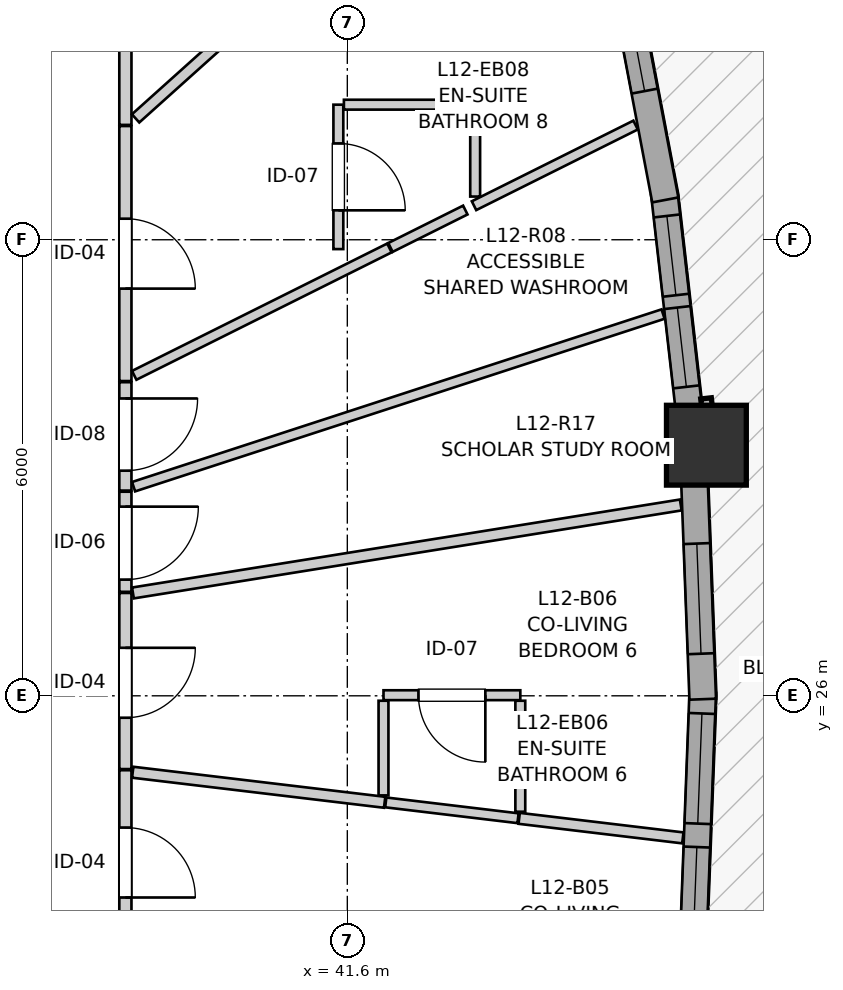
"""IFC4 building model, lengths in metres.
Left out: names, types, materials, properties, quantities, classifications, styles, units other than length and angle.
Written with IfcOpenShell. Run it as: python <this file> out.ifc"""

import sys

from ifc_helpers import new_model, si_unit, direction, frame, frame_2d, origin, origin_2d, place, context, subcontext, project, spatial, rectangle, extrude, source, transform, mapped, element, fill, save


model = new_model("IFC4")
c1 = context("Model", 3, precision=1e-05, world=origin(), true_north=direction((0.0, 1.0)))
c2 = subcontext(c1, "Body", "Model", "MODEL_VIEW")
j1 = project(units=[si_unit("LENGTHUNIT", "METRE"), si_unit("PLANEANGLEUNIT", "RADIAN")], contexts=[c1])
p1 = place(None, origin())
s1 = spatial("IfcSite", under=j1, at=p1, CompositionType="ELEMENT")
p2 = place(p1, origin())
s2 = spatial("IfcBuilding", under=s1, at=p2, CompositionType="ELEMENT")
p3 = place(p2, frame((0.0, 0.0, 43.0)))
s3 = spatial("IfcBuildingStorey", under=s2, at=p3, CompositionType="ELEMENT", Elevation=43.0)
m1 = source(origin(), c2, "Body", "SweptSolid", [
    extrude(rectangle(XDim=1.05, YDim=1.05, at=origin_2d()), origin(), (0.0, 0.0, 1.0), 2.94),
])
p4 = place(p3, frame((46.324, 29.297, 0.0), z_axis=(0.0, 0.0, 1.0), x_axis=(1.0, 0.0, 0.0)))
e1 = element("IfcColumn", 1, at=p4, inside=s3, PredefinedType="COLUMN", context=c2, shape_type="MappedRepresentation", body=[
    mapped(m1, transform((0.0, 0.0, 0.0), x_axis=(1.0, 0.0, 0.0), y_axis=(0.0, 1.0, 0.0), z_axis=(0.0, 0.0, 1.0), scale=1.0)),
])
p5 = place(p3, frame((46.15, 22.729, 0.0), z_axis=(0.0, 0.0, 1.0), x_axis=(0.03797244671, 0.999278786571, 0.0)))
e2 = element("IfcWall", 2, at=p5, inside=s3, PredefinedType="SOLIDWALL", context=c2, shape_type="SweptSolid", body=[
    extrude(rectangle(XDim=3.318, YDim=0.35, at=frame_2d((1.659, 0.0))), origin(), (0.0, 0.0, 1.0), 2.42),
])
p6 = place(p5, frame((0.332, 0.0, 0.82)))
e3 = element("IfcOpeningElement", 3, at=p6, cuts=e2, PredefinedType="OPENING", context=c2, shape_type="SweptSolid", body=[
    extrude(rectangle(XDim=0.95, YDim=1.35, at=frame_2d((0.475, 0.675))), frame((0.0, 0.185, 0.0), z_axis=(0.0, -1.0, 0.0), x_axis=(1.0, 0.0, 0.0)), (0.0, 0.0, 1.0), 0.37),
])
p7 = place(p5, frame((1.59, 0.0, 0.82)))
e4 = element("IfcOpeningElement", 4, at=p7, cuts=e2, PredefinedType="OPENING", context=c2, shape_type="SweptSolid", body=[
    extrude(rectangle(XDim=1.45, YDim=1.25, at=frame_2d((0.725, 0.625))), frame((0.0, 0.185, 0.0), z_axis=(0.0, -1.0, 0.0), x_axis=(1.0, 0.0, 0.0)), (0.0, 0.0, 1.0), 0.37),
])
p8 = place(p3, frame((46.276, 25.955, 0.0), z_axis=(0.0, 0.0, 1.0), x_axis=(-0.037939203929, 0.999280049238, 0.0)))
e5 = element("IfcWall", 5, at=p8, inside=s3, PredefinedType="SOLIDWALL", context=c2, shape_type="SweptSolid", body=[
    extrude(rectangle(XDim=3.037, YDim=0.35, at=frame_2d((1.519, 0.0))), origin(), (0.0, 0.0, 1.0), 2.42),
])
p9 = place(p8, frame((0.599, 0.0, 0.82)))
e6 = element("IfcOpeningElement", 6, at=p9, cuts=e5, PredefinedType="OPENING", context=c2, shape_type="SweptSolid", body=[
    extrude(rectangle(XDim=1.45, YDim=1.25, at=frame_2d((0.725, 0.625))), frame((0.0, 0.185, 0.0), z_axis=(0.0, -1.0, 0.0), x_axis=(1.0, 0.0, 0.0)), (0.0, 0.0, 1.0), 0.37),
])
p10 = place(p3, frame((46.116, 29.575, 0.0), z_axis=(0.0, 0.0, 1.0), x_axis=(-0.113271733229, 0.993564046477, 0.0)))
e7 = element("IfcWall", 7, at=p10, inside=s3, PredefinedType="SOLIDWALL", context=c2, shape_type="SweptSolid", body=[
    extrude(rectangle(XDim=3.056, YDim=0.35, at=frame_2d((1.528, 0.0))), origin(), (0.0, 0.0, 1.0), 2.42),
])
p11 = place(p10, frame((0.492, 0.0, 0.82)))
e8 = element("IfcOpeningElement", 8, at=p11, cuts=e7, PredefinedType="OPENING", context=c2, shape_type="SweptSolid", body=[
    extrude(rectangle(XDim=1.05, YDim=1.45, at=frame_2d((0.525, 0.725))), frame((0.0, 0.185, 0.0), z_axis=(0.0, -1.0, 0.0), x_axis=(1.0, 0.0, 0.0)), (0.0, 0.0, 1.0), 0.37),
])
p12 = place(p10, frame((1.706, 0.0, 0.82)))
e9 = element("IfcOpeningElement", 9, at=p12, cuts=e7, PredefinedType="OPENING", context=c2, shape_type="SweptSolid", body=[
    extrude(rectangle(XDim=1.05, YDim=1.45, at=frame_2d((0.525, 0.725))), frame((0.0, 0.185, 0.0), z_axis=(0.0, -1.0, 0.0), x_axis=(1.0, 0.0, 0.0)), (0.0, 0.0, 1.0), 0.37),
])
p13 = place(p3, frame((45.784, 32.524, 0.0), z_axis=(0.0, 0.0, 1.0), x_axis=(-0.186686485801, 0.982419541754, 0.0)))
e10 = element("IfcWall", 10, at=p13, inside=s3, PredefinedType="SOLIDWALL", context=c2, shape_type="SweptSolid", body=[
    extrude(rectangle(XDim=3.374, YDim=0.35, at=frame_2d((1.687, 0.0))), origin(), (0.0, 0.0, 1.0), 2.42),
])
p14 = place(p13, frame((1.457, 0.0, 0.82)))
e11 = element("IfcOpeningElement", 11, at=p14, cuts=e10, PredefinedType="OPENING", context=c2, shape_type="SweptSolid", body=[
    extrude(rectangle(XDim=1.45, YDim=1.25, at=frame_2d((0.725, 0.625))), frame((0.0, 0.185, 0.0), z_axis=(0.0, -1.0, 0.0), x_axis=(1.0, 0.0, 0.0)), (0.0, 0.0, 1.0), 0.37),
])
p15 = place(p3, frame((38.68, 33.496, 0.0), z_axis=(0.0, 0.0, 1.0), x_axis=(0.0, -1.0, 0.0)))
e12 = element("IfcWall", 12, at=p15, inside=s3, PredefinedType="PARTITIONING", context=c2, shape_type="SweptSolid", body=[
    extrude(rectangle(XDim=3.355, YDim=0.16, at=frame_2d((1.677, 0.0))), origin(), (0.0, 0.0, 1.0), 2.94),
])
p16 = place(p15, frame((1.219, 0.0, 0.0)))
e13 = element("IfcOpeningElement", 13, at=p16, cuts=e12, PredefinedType="OPENING", context=c2, shape_type="SweptSolid", body=[
    extrude(rectangle(XDim=0.92, YDim=2.1, at=frame_2d((0.46, 1.05))), frame((0.0, 0.09, 0.0), z_axis=(0.0, -1.0, 0.0), x_axis=(1.0, 0.0, 0.0)), (0.0, 0.0, 1.0), 0.18),
])
p17 = place(p3, frame((38.68, 36.58, 0.0), z_axis=(0.0, 0.0, 1.0), x_axis=(0.0, -1.0, 0.0)))
e14 = element("IfcWall", 14, at=p17, inside=s3, PredefinedType="PARTITIONING", context=c2, shape_type="SweptSolid", body=[
    extrude(rectangle(XDim=3.069, YDim=0.16, at=frame_2d((1.535, 0.0))), origin(), (0.0, 0.0, 1.0), 2.94),
])
p18 = place(p17, frame((1.092, 0.0, 0.0)))
e15 = element("IfcOpeningElement", 15, at=p18, cuts=e14, PredefinedType="OPENING", context=c2, shape_type="SweptSolid", body=[
    extrude(rectangle(XDim=0.92, YDim=2.1, at=frame_2d((0.46, 1.05))), frame((0.0, 0.09, 0.0), z_axis=(0.0, -1.0, 0.0), x_axis=(1.0, 0.0, 0.0)), (0.0, 0.0, 1.0), 0.18),
])
p19 = place(p3, frame((38.68, 25.021, 0.0), z_axis=(0.0, 0.0, 1.0), x_axis=(0.0, -1.0, 0.0)))
e16 = element("IfcWall", 16, at=p19, inside=s3, PredefinedType="PARTITIONING", context=c2, shape_type="SweptSolid", body=[
    extrude(rectangle(XDim=2.383, YDim=0.16, at=frame_2d((1.191, 0.0))), origin(), (0.0, 0.0, 1.0), 2.94),
])
p20 = place(p19, frame((0.754, 0.0, 0.0)))
e17 = element("IfcOpeningElement", 17, at=p20, cuts=e16, PredefinedType="OPENING", context=c2, shape_type="SweptSolid", body=[
    extrude(rectangle(XDim=0.92, YDim=2.1, at=frame_2d((0.46, 1.05))), frame((0.0, 0.09, 0.0), z_axis=(0.0, -1.0, 0.0), x_axis=(1.0, 0.0, 0.0)), (0.0, 0.0, 1.0), 0.18),
])
p21 = place(p3, frame((38.68, 27.353, 0.0), z_axis=(0.0, 0.0, 1.0), x_axis=(0.0, -1.0, 0.0)))
e18 = element("IfcWall", 18, at=p21, inside=s3, PredefinedType="PARTITIONING", context=c2, shape_type="SweptSolid", body=[
    extrude(rectangle(XDim=2.317, YDim=0.16, at=frame_2d((1.159, 0.0))), origin(), (0.0, 0.0, 1.0), 2.94),
])
p22 = place(p21, frame((0.721, 0.0, 0.0)))
e19 = element("IfcOpeningElement", 19, at=p22, cuts=e18, PredefinedType="OPENING", context=c2, shape_type="SweptSolid", body=[
    extrude(rectangle(XDim=0.92, YDim=2.1, at=frame_2d((0.46, 1.05))), frame((0.0, 0.09, 0.0), z_axis=(0.0, -1.0, 0.0), x_axis=(1.0, 0.0, 0.0)), (0.0, 0.0, 1.0), 0.18),
])
p23 = place(p3, frame((41.482, 33.777, 0.0), z_axis=(0.0, 0.0, 1.0), x_axis=(0.0, -1.0, 0.0)))
e20 = element("IfcWall", 20, at=p23, inside=s3, PredefinedType="PARTITIONING", context=c2, shape_type="SweptSolid", body=[
    extrude(rectangle(XDim=1.9, YDim=0.13, at=frame_2d((0.95, 0.0))), origin(), (0.0, 0.0, 1.0), 2.94),
])
p24 = place(p23, frame((0.51, 0.0, 0.0)))
e21 = element("IfcOpeningElement", 21, at=p24, cuts=e20, PredefinedType="OPENING", context=c2, shape_type="SweptSolid", body=[
    extrude(rectangle(XDim=0.88, YDim=2.05, at=frame_2d((0.44, 1.025))), frame((0.0, 0.075, 0.0), z_axis=(0.0, -1.0, 0.0), x_axis=(1.0, 0.0, 0.0)), (0.0, 0.0, 1.0), 0.15),
])
p25 = place(p3, frame((43.876, 26.008, 0.0), z_axis=(0.0, 0.0, 1.0), x_axis=(-1.0, 0.0, 0.0)))
e22 = element("IfcWall", 22, at=p25, inside=s3, PredefinedType="PARTITIONING", context=c2, shape_type="SweptSolid", body=[
    extrude(rectangle(XDim=1.8, YDim=0.13, at=frame_2d((0.9, 0.0))), origin(), (0.0, 0.0, 1.0), 2.94),
])
p26 = place(p25, frame((0.46, 0.0, 0.0)))
e23 = element("IfcOpeningElement", 23, at=p26, cuts=e22, PredefinedType="OPENING", context=c2, shape_type="SweptSolid", body=[
    extrude(rectangle(XDim=0.88, YDim=2.05, at=frame_2d((0.44, 1.025))), frame((0.0, 0.075, 0.0), z_axis=(0.0, -1.0, 0.0), x_axis=(1.0, 0.0, 0.0)), (0.0, 0.0, 1.0), 0.15),
])
p27 = place(p3, frame((38.68, 30.126, 0.0), z_axis=(0.0, 0.0, 1.0), x_axis=(0.0, -1.0, 0.0)))
e24 = element("IfcWall", 24, at=p27, inside=s3, PredefinedType="PARTITIONING", context=c2, shape_type="SweptSolid", body=[
    extrude(rectangle(XDim=1.426, YDim=0.16, at=frame_2d((0.713, 0.0))), origin(), (0.0, 0.0, 1.0), 2.94),
])
p28 = place(p27, frame((0.214, 0.0, 0.0)))
e25 = element("IfcOpeningElement", 25, at=p28, cuts=e24, PredefinedType="OPENING", context=c2, shape_type="SweptSolid", body=[
    extrude(rectangle(XDim=0.95, YDim=2.1, at=frame_2d((0.475, 1.05))), frame((0.0, 0.09, 0.0), z_axis=(0.0, -1.0, 0.0), x_axis=(1.0, 0.0, 0.0)), (0.0, 0.0, 1.0), 0.18),
])
p29 = place(p3, frame((38.68, 28.685, 0.0), z_axis=(0.0, 0.0, 1.0), x_axis=(0.0, -1.0, 0.0)))
e26 = element("IfcWall", 26, at=p29, inside=s3, PredefinedType="PARTITIONING", context=c2, shape_type="SweptSolid", body=[
    extrude(rectangle(XDim=1.317, YDim=0.16, at=frame_2d((0.659, 0.0))), origin(), (0.0, 0.0, 1.0), 2.94),
])
p30 = place(p29, frame((0.196, 0.0, 0.0)))
e27 = element("IfcOpeningElement", 27, at=p30, cuts=e26, PredefinedType="OPENING", context=c2, shape_type="SweptSolid", body=[
    extrude(rectangle(XDim=0.96, YDim=2.1, at=frame_2d((0.48, 1.05))), frame((0.0, 0.09, 0.0), z_axis=(0.0, -1.0, 0.0), x_axis=(1.0, 0.0, 0.0)), (0.0, 0.0, 1.0), 0.18),
])
p31 = place(p3, frame((38.788, 28.751, 0.0), z_axis=(0.0, 0.0, 1.0), x_axis=(0.95075822996, 0.309933522169, 0.0)))
e28 = element("IfcWall", 28, at=p31, inside=s3, PredefinedType="PARTITIONING", context=c2, shape_type="SweptSolid", body=[
    extrude(rectangle(XDim=7.327, YDim=0.13, at=frame_2d((3.664, 0.0))), origin(), (0.0, 0.0, 1.0), 2.94),
])
p32 = place(p3, frame((38.779, 27.353, 0.0), z_axis=(0.0, 0.0, 1.0), x_axis=(0.987345710334, 0.158582622897, 0.0)))
e29 = element("IfcWall", 29, at=p32, inside=s3, PredefinedType="PARTITIONING", context=c2, shape_type="SweptSolid", body=[
    extrude(rectangle(XDim=7.3, YDim=0.145, at=frame_2d((3.65, 0.0))), origin(), (0.0, 0.0, 1.0), 2.94),
])
p33 = place(p3, frame((38.814, 33.597, 0.0), z_axis=(0.0, 0.0, 1.0), x_axis=(0.74417856937, 0.667980730927, 0.0)))
e30 = element("IfcWall", 30, at=p33, inside=s3, PredefinedType="PARTITIONING", context=c2, shape_type="SweptSolid", body=[
    extrude(rectangle(XDim=4.005, YDim=0.145, at=frame_2d((2.002, 0.0))), origin(), (0.0, 0.0, 1.0), 2.94),
])
p34 = place(p3, frame((38.796, 30.216, 0.0), z_axis=(0.0, 0.0, 1.0), x_axis=(0.894739227469, 0.446588977503, 0.0)))
e31 = element("IfcWall", 31, at=p34, inside=s3, PredefinedType="PARTITIONING", context=c2, shape_type="SweptSolid", body=[
    extrude(rectangle(XDim=3.753, YDim=0.13, at=frame_2d((1.876, 0.0))), origin(), (0.0, 0.0, 1.0), 2.94),
])
p35 = place(p3, frame((38.777, 24.994, 0.0), z_axis=(0.0, 0.0, 1.0), x_axis=(0.992964132073, -0.1184155075, 0.0)))
e32 = element("IfcWall", 32, at=p35, inside=s3, PredefinedType="PARTITIONING", context=c2, shape_type="SweptSolid", body=[
    extrude(rectangle(XDim=3.338, YDim=0.145, at=frame_2d((1.669, 0.0))), origin(), (0.0, 0.0, 1.0), 2.94),
])
p36 = place(p3, frame((43.267, 32.448, 0.0), z_axis=(0.0, 0.0, 1.0), x_axis=(0.894755827923, 0.446555717014, 0.0)))
e33 = element("IfcWall", 33, at=p36, inside=s3, PredefinedType="PARTITIONING", context=c2, shape_type="SweptSolid", body=[
    extrude(rectangle(XDim=2.375, YDim=0.13, at=frame_2d((1.188, 0.0))), origin(), (0.0, 0.0, 1.0), 2.94),
])
p37 = place(p3, frame((43.861, 24.388, 0.0), z_axis=(0.0, 0.0, 1.0), x_axis=(0.992948573357, -0.118545901105, 0.0)))
e34 = element("IfcWall", 34, at=p37, inside=s3, PredefinedType="PARTITIONING", context=c2, shape_type="SweptSolid", body=[
    extrude(rectangle(XDim=2.169, YDim=0.145, at=frame_2d((1.084, 0.0))), origin(), (0.0, 0.0, 1.0), 2.94),
])
p38 = place(p3, frame((41.555, 33.777, 0.0), z_axis=(0.0, 0.0, 1.0), x_axis=(1.0, 0.0, 0.0)))
e35 = element("IfcWall", 35, at=p38, inside=s3, PredefinedType="PARTITIONING", context=c2, shape_type="SweptSolid", body=[
    extrude(rectangle(XDim=1.727, YDim=0.13, at=frame_2d((0.864, 0.0))), origin(), (0.0, 0.0, 1.0), 2.94),
])
p39 = place(p3, frame((42.106, 24.598, 0.0), z_axis=(0.0, 0.0, 1.0), x_axis=(0.992915674768, -0.118821137848, 0.0)))
e36 = element("IfcWall", 36, at=p39, inside=s3, PredefinedType="PARTITIONING", context=c2, shape_type="SweptSolid", body=[
    extrude(rectangle(XDim=1.753, YDim=0.13, at=frame_2d((0.876, 0.0))), origin(), (0.0, 0.0, 1.0), 2.94),
])
p40 = place(p3, frame((43.876, 24.475, 0.0), z_axis=(0.0, 0.0, 1.0), x_axis=(0.0, 1.0, 0.0)))
e37 = element("IfcWall", 37, at=p40, inside=s3, PredefinedType="PARTITIONING", context=c2, shape_type="SweptSolid", body=[
    extrude(rectangle(XDim=1.46, YDim=0.13, at=frame_2d((0.73, 0.0))), origin(), (0.0, 0.0, 1.0), 2.94),
])
p41 = place(p3, frame((42.076, 24.69, 0.0), z_axis=(0.0, 0.0, 1.0), x_axis=(0.0, 1.0, 0.0)))
e38 = element("IfcWall", 38, at=p41, inside=s3, PredefinedType="PARTITIONING", context=c2, shape_type="SweptSolid", body=[
    extrude(rectangle(XDim=1.245, YDim=0.13, at=frame_2d((0.623, 0.0))), origin(), (0.0, 0.0, 1.0), 2.94),
])
p42 = place(p3, frame((43.282, 32.568, 0.0), z_axis=(0.0, 0.0, 1.0), x_axis=(0.0, 1.0, 0.0)))
e39 = element("IfcWall", 39, at=p42, inside=s3, PredefinedType="PARTITIONING", context=c2, shape_type="SweptSolid", body=[
    extrude(rectangle(XDim=1.136, YDim=0.13, at=frame_2d((0.568, 0.0))), origin(), (0.0, 0.0, 1.0), 2.94),
])
p43 = place(p3, frame((42.167, 31.899, 0.0), z_axis=(0.0, 0.0, 1.0), x_axis=(0.894604533516, 0.446858734515, 0.0)))
e40 = element("IfcWall", 40, at=p43, inside=s3, PredefinedType="PARTITIONING", context=c2, shape_type="SweptSolid", body=[
    extrude(rectangle(XDim=1.101, YDim=0.13, at=frame_2d((0.55, 0.0))), origin(), (0.0, 0.0, 1.0), 2.94),
])
m2 = source(origin(), c2, "Body", "SweptSolid", [
    extrude(rectangle(XDim=0.95, YDim=1.35, at=frame_2d((0.475, 0.675))), frame((0.0, 0.03, 0.0), z_axis=(0.0, -1.0, 0.0), x_axis=(1.0, 0.0, 0.0)), (0.0, 0.0, 1.0), 0.06),
])
p44 = place(p6, origin())
e41 = element("IfcWindow", 41, at=p44, inside=s3, PartitioningType="SINGLE_PANEL", PredefinedType="WINDOW", context=c2, shape_type="MappedRepresentation", body=[
    mapped(m2, transform((0.0, 0.0, 0.0), x_axis=(1.0, 0.0, 0.0), y_axis=(0.0, 1.0, 0.0), z_axis=(0.0, 0.0, 1.0), scale=1.0)),
])
fill(e3, e41)
m3 = source(origin(), c2, "Body", "SweptSolid", [
    extrude(rectangle(XDim=1.45, YDim=1.25, at=frame_2d((0.725, 0.625))), frame((0.0, 0.03, 0.0), z_axis=(0.0, -1.0, 0.0), x_axis=(1.0, 0.0, 0.0)), (0.0, 0.0, 1.0), 0.06),
])
p45 = place(p7, origin())
e42 = element("IfcWindow", 42, at=p45, inside=s3, PartitioningType="SINGLE_PANEL", PredefinedType="WINDOW", context=c2, shape_type="MappedRepresentation", body=[
    mapped(m3, transform((0.0, 0.0, 0.0), x_axis=(1.0, 0.0, 0.0), y_axis=(0.0, 1.0, 0.0), z_axis=(0.0, 0.0, 1.0), scale=1.0)),
])
fill(e4, e42)
p46 = place(p9, origin())
e43 = element("IfcWindow", 43, at=p46, inside=s3, PartitioningType="SINGLE_PANEL", PredefinedType="WINDOW", context=c2, shape_type="MappedRepresentation", body=[
    mapped(m3, transform((0.0, 0.0, 0.0), x_axis=(1.0, 0.0, 0.0), y_axis=(0.0, 1.0, 0.0), z_axis=(0.0, 0.0, 1.0), scale=1.0)),
])
fill(e6, e43)
m4 = source(origin(), c2, "Body", "SweptSolid", [
    extrude(rectangle(XDim=1.05, YDim=1.45, at=frame_2d((0.525, 0.725))), frame((0.0, 0.03, 0.0), z_axis=(0.0, -1.0, 0.0), x_axis=(1.0, 0.0, 0.0)), (0.0, 0.0, 1.0), 0.06),
])
p47 = place(p11, origin())
e44 = element("IfcWindow", 44, at=p47, inside=s3, PartitioningType="SINGLE_PANEL", PredefinedType="WINDOW", context=c2, shape_type="MappedRepresentation", body=[
    mapped(m4, transform((0.0, 0.0, 0.0), x_axis=(1.0, 0.0, 0.0), y_axis=(0.0, 1.0, 0.0), z_axis=(0.0, 0.0, 1.0), scale=1.0)),
])
fill(e8, e44)
p48 = place(p12, origin())
e45 = element("IfcWindow", 45, at=p48, inside=s3, PartitioningType="SINGLE_PANEL", PredefinedType="WINDOW", context=c2, shape_type="MappedRepresentation", body=[
    mapped(m4, transform((0.0, 0.0, 0.0), x_axis=(1.0, 0.0, 0.0), y_axis=(0.0, 1.0, 0.0), z_axis=(0.0, 0.0, 1.0), scale=1.0)),
])
fill(e9, e45)
p49 = place(p14, origin())
e46 = element("IfcWindow", 46, at=p49, inside=s3, PartitioningType="SINGLE_PANEL", PredefinedType="WINDOW", context=c2, shape_type="MappedRepresentation", body=[
    mapped(m3, transform((0.0, 0.0, 0.0), x_axis=(1.0, 0.0, 0.0), y_axis=(0.0, 1.0, 0.0), z_axis=(0.0, 0.0, 1.0), scale=1.0)),
])
fill(e11, e46)
m5 = source(origin(), c2, "Body", "SweptSolid", [
    extrude(rectangle(XDim=0.92, YDim=2.1, at=frame_2d((0.46, 1.05))), frame((0.0, 0.025, 0.0), z_axis=(0.0, -1.0, 0.0), x_axis=(1.0, 0.0, 0.0)), (0.0, 0.0, 1.0), 0.05),
])
p50 = place(p16, origin())
e47 = element("IfcDoor", 47, at=p50, inside=s3, OperationType="SINGLE_SWING_RIGHT", PredefinedType="DOOR", context=c2, shape_type="MappedRepresentation", body=[
    mapped(m5, transform((0.0, 0.0, 0.0), x_axis=(1.0, 0.0, 0.0), y_axis=(0.0, 1.0, 0.0), z_axis=(0.0, 0.0, 1.0), scale=1.0)),
])
fill(e13, e47)
p51 = place(p20, origin())
e48 = element("IfcDoor", 48, at=p51, inside=s3, OperationType="SINGLE_SWING_RIGHT", PredefinedType="DOOR", context=c2, shape_type="MappedRepresentation", body=[
    mapped(m5, transform((0.0, 0.0, 0.0), x_axis=(1.0, 0.0, 0.0), y_axis=(0.0, 1.0, 0.0), z_axis=(0.0, 0.0, 1.0), scale=1.0)),
])
fill(e17, e48)
p52 = place(p22, origin())
e49 = element("IfcDoor", 49, at=p52, inside=s3, OperationType="SINGLE_SWING_LEFT", PredefinedType="DOOR", context=c2, shape_type="MappedRepresentation", body=[
    mapped(m5, transform((0.0, 0.0, 0.0), x_axis=(1.0, 0.0, 0.0), y_axis=(0.0, 1.0, 0.0), z_axis=(0.0, 0.0, 1.0), scale=1.0)),
])
fill(e19, e49)
m6 = source(origin(), c2, "Body", "SweptSolid", [
    extrude(rectangle(XDim=0.88, YDim=2.05, at=frame_2d((0.44, 1.025))), frame((0.0, 0.025, 0.0), z_axis=(0.0, -1.0, 0.0), x_axis=(1.0, 0.0, 0.0)), (0.0, 0.0, 1.0), 0.05),
])
p53 = place(p24, origin())
e50 = element("IfcDoor", 50, at=p53, inside=s3, OperationType="SINGLE_SWING_RIGHT", PredefinedType="DOOR", context=c2, shape_type="MappedRepresentation", body=[
    mapped(m6, transform((0.0, 0.0, 0.0), x_axis=(1.0, 0.0, 0.0), y_axis=(0.0, 1.0, 0.0), z_axis=(0.0, 0.0, 1.0), scale=1.0)),
])
fill(e21, e50)
p54 = place(p26, origin())
e51 = element("IfcDoor", 51, at=p54, inside=s3, OperationType="SINGLE_SWING_LEFT", PredefinedType="DOOR", context=c2, shape_type="MappedRepresentation", body=[
    mapped(m6, transform((0.0, 0.0, 0.0), x_axis=(1.0, 0.0, 0.0), y_axis=(0.0, 1.0, 0.0), z_axis=(0.0, 0.0, 1.0), scale=1.0)),
])
fill(e23, e51)
m7 = source(origin(), c2, "Body", "SweptSolid", [
    extrude(rectangle(XDim=0.95, YDim=2.1, at=frame_2d((0.475, 1.05))), frame((0.0, 0.025, 0.0), z_axis=(0.0, -1.0, 0.0), x_axis=(1.0, 0.0, 0.0)), (0.0, 0.0, 1.0), 0.05),
])
p55 = place(p28, origin())
e52 = element("IfcDoor", 52, at=p55, inside=s3, OperationType="SINGLE_SWING_LEFT", PredefinedType="DOOR", context=c2, shape_type="MappedRepresentation", body=[
    mapped(m7, transform((0.0, 0.0, 0.0), x_axis=(1.0, 0.0, 0.0), y_axis=(0.0, 1.0, 0.0), z_axis=(0.0, 0.0, 1.0), scale=1.0)),
])
fill(e25, e52)
m8 = source(origin(), c2, "Body", "SweptSolid", [
    extrude(rectangle(XDim=0.96, YDim=2.1, at=frame_2d((0.48, 1.05))), frame((0.0, 0.025, 0.0), z_axis=(0.0, -1.0, 0.0), x_axis=(1.0, 0.0, 0.0)), (0.0, 0.0, 1.0), 0.05),
])
p56 = place(p30, origin())
e53 = element("IfcDoor", 53, at=p56, inside=s3, OperationType="SINGLE_SWING_LEFT", PredefinedType="DOOR", context=c2, shape_type="MappedRepresentation", body=[
    mapped(m8, transform((0.0, 0.0, 0.0), x_axis=(1.0, 0.0, 0.0), y_axis=(0.0, 1.0, 0.0), z_axis=(0.0, 0.0, 1.0), scale=1.0)),
])
fill(e27, e53)
save(model, sys.argv[1])
